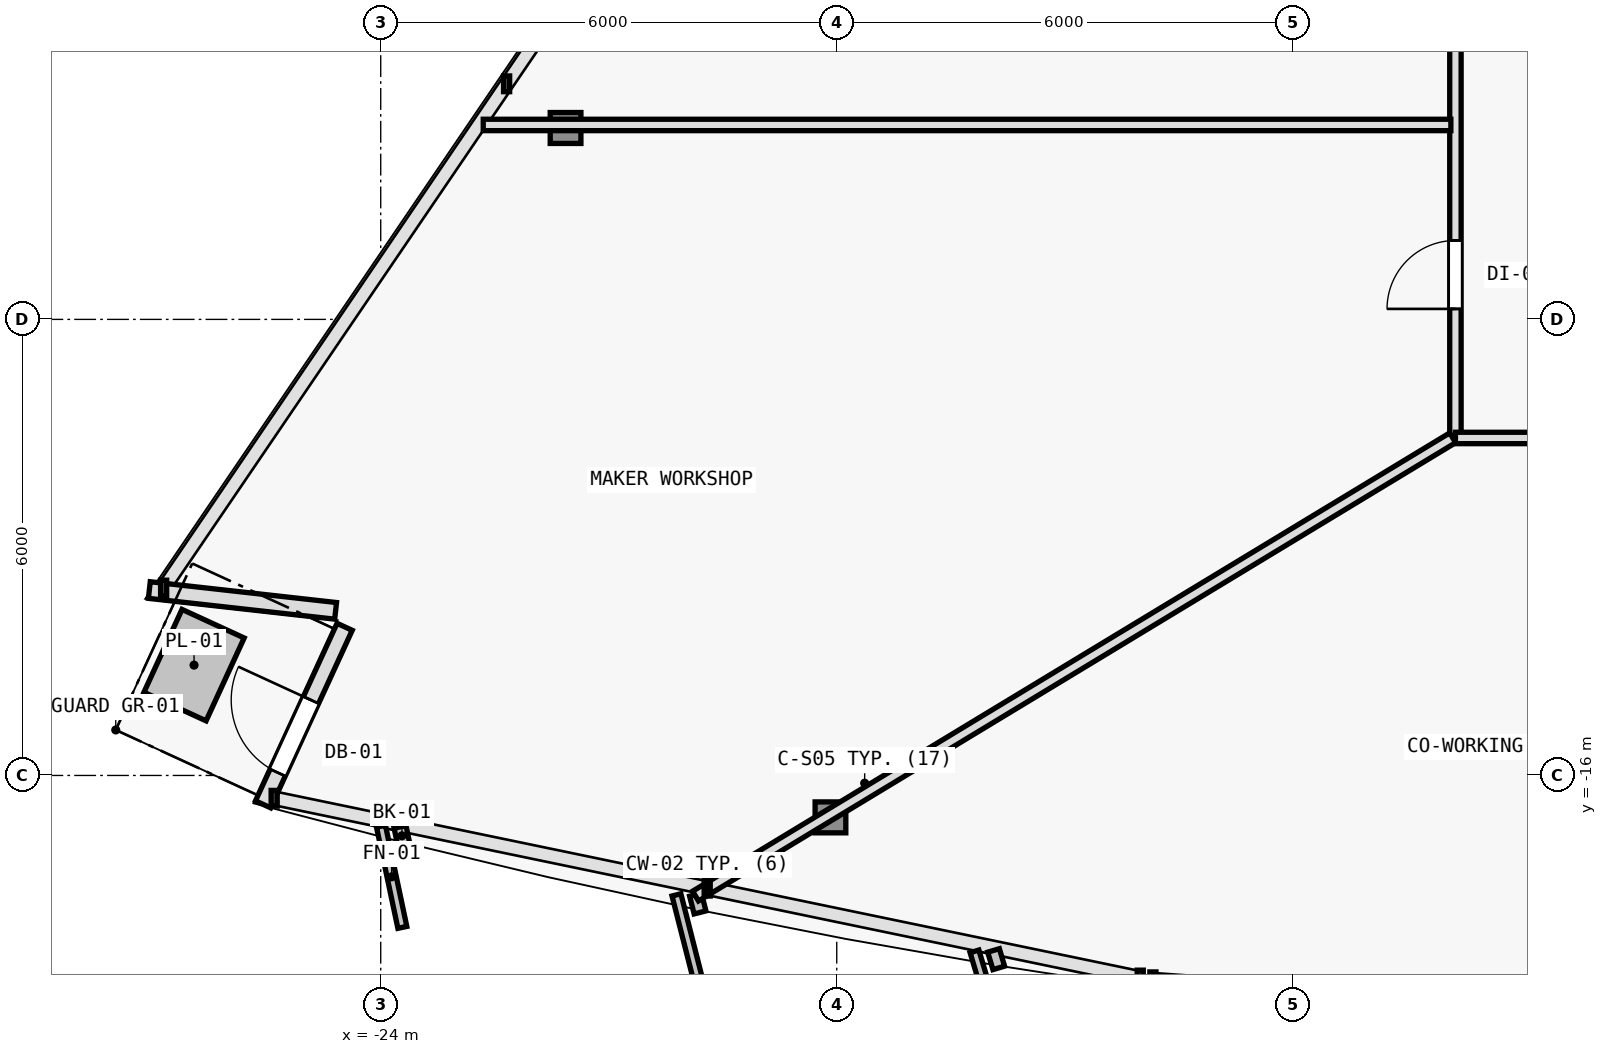
"""IFC4 building model, lengths in metres.
Left out: names, types, materials, properties, quantities, classifications, styles, units other than length and angle.
Written with IfcOpenShell. Run it as: python <this file> out.ifc"""

import sys

from ifc_helpers import new_model, si_unit, direction, frame, frame_2d, origin, origin_2d, place, context, subcontext, project, spatial, rectangle, i_section, extrude, element, fill, save


model = new_model("IFC4")
c1 = context("Model", 3, precision=1e-05, world=origin(), true_north=direction((0.0, 1.0)))
c2 = subcontext(c1, "Body", "Model", "MODEL_VIEW")
j1 = project(units=[si_unit("LENGTHUNIT", "METRE"), si_unit("PLANEANGLEUNIT", "RADIAN")], contexts=[c1])
p1 = place(None, origin())
s1 = spatial("IfcSite", under=j1, at=p1, CompositionType="ELEMENT")
p2 = place(p1, origin())
s2 = spatial("IfcBuilding", under=s1, at=p2, CompositionType="ELEMENT")
p3 = place(p2, frame((0.0, 0.0, 142.2)))
s3 = spatial("IfcBuildingStorey", under=s2, at=p3, CompositionType="ELEMENT", Elevation=142.2)
p4 = place(p3, frame((-18.083, -16.552, 0.006), z_axis=(0.021139215222, 0.034393707082, 0.999184770947), x_axis=(-0.851947232707, 0.52362764698, 0.0)))
e1 = element("IfcColumn", 1, at=p4, inside=s3, PredefinedType="COLUMN", context=c2, shape_type="SweptSolid", body=[
    extrude(i_section(OverallWidth=0.404, OverallDepth=0.407, WebThickness=0.017, FlangeThickness=0.028, FilletRadius=0.015, at=origin_2d()), origin(), (0.0, 0.0, 1.0), 3.592),
])
p5 = place(p3, frame((-21.568, -7.482, 0.006), z_axis=(0.025971243376, 0.022163940683, 0.999416957156), x_axis=(-0.649149996291, 0.760660425102, 0.0)))
e2 = element("IfcColumn", 2, at=p5, inside=s3, PredefinedType="COLUMN", context=c2, shape_type="SweptSolid", body=[
    extrude(i_section(OverallWidth=0.404, OverallDepth=0.407, WebThickness=0.017, FlangeThickness=0.028, FilletRadius=0.015, at=origin_2d()), origin(), (0.0, 0.0, 1.0), 3.591),
])
p6 = place(p3, frame((-24.594, -13.834, 0.0), z_axis=(0.0, 0.0, 1.0), x_axis=(-0.993823222634, 0.110974781609, 0.0)))
e3 = element("IfcWall", 3, at=p6, inside=s3, PredefinedType="SOLIDWALL", context=c2, shape_type="SweptSolid", body=[
    extrude(rectangle(XDim=2.466, YDim=0.22, at=frame_2d((1.233, 0.0))), origin(), (0.0, 0.0, 1.0), 3.35),
])
p7 = place(p3, frame((-25.548, -16.38, 0.0), z_axis=(0.0, 0.0, 1.0), x_axis=(0.417449299542, 0.908700215864, 0.0)))
e4 = element("IfcWall", 4, at=p7, inside=s3, PredefinedType="SOLIDWALL", context=c2, shape_type="SweptSolid", body=[
    extrude(rectangle(XDim=2.57, YDim=0.22, at=frame_2d((1.285, 0.0))), origin(), (0.0, 0.0, 1.0), 3.35),
])
p8 = place(p7, frame((0.46, 0.0, 0.0)))
e5 = element("IfcOpeningElement", 5, at=p8, cuts=e4, PredefinedType="OPENING", context=c2, shape_type="SweptSolid", body=[
    extrude(rectangle(XDim=1.05, YDim=2.15, at=frame_2d((0.525, 1.075))), frame((0.0, 0.12, 0.0), z_axis=(0.0, -1.0, 0.0), x_axis=(1.0, 0.0, 0.0)), (0.0, 0.0, 1.0), 0.24),
])
p9 = place(p3, frame((-9.86, -11.56, 0.0), z_axis=(0.0, 0.0, 1.0), x_axis=(0.0, 1.0, 0.0)))
e6 = element("IfcWall", 6, at=p9, inside=s3, PredefinedType="PARTITIONING", context=c2, shape_type="SweptSolid", body=[
    extrude(rectangle(XDim=19.986, YDim=0.15, at=frame_2d((9.993, 0.0))), origin(), (0.0, 0.0, 1.0), 2.775),
])
p10 = place(p9, frame((7.769, 0.0, 0.0)))
e7 = element("IfcOpeningElement", 7, at=p10, cuts=e6, PredefinedType="OPENING", context=c2, shape_type="SweptSolid", body=[
    extrude(rectangle(XDim=0.9, YDim=2.1, at=frame_2d((0.45, 1.05))), frame((0.0, 0.085, 0.0), z_axis=(0.0, -1.0, 0.0), x_axis=(1.0, 0.0, 0.0)), (0.0, 0.0, 1.0), 0.17),
])
p11 = place(p9, frame((1.698, 0.0, 0.0)))
e8 = element("IfcOpeningElement", 8, at=p11, cuts=e6, PredefinedType="OPENING", context=c2, shape_type="SweptSolid", body=[
    extrude(rectangle(XDim=0.9, YDim=2.1, at=frame_2d((0.45, 1.05))), frame((0.0, 0.085, 0.0), z_axis=(0.0, -1.0, 0.0), x_axis=(1.0, 0.0, 0.0)), (0.0, 0.0, 1.0), 0.17),
])
p12 = place(p9, frame((15.614, 0.0, 0.0)))
e9 = element("IfcOpeningElement", 9, at=p12, cuts=e6, PredefinedType="OPENING", context=c2, shape_type="SweptSolid", body=[
    extrude(rectangle(XDim=0.9, YDim=2.1, at=frame_2d((0.45, 1.05))), frame((0.0, 0.085, 0.0), z_axis=(0.0, -1.0, 0.0), x_axis=(1.0, 0.0, 0.0)), (0.0, 0.0, 1.0), 0.17),
])
p13 = place(p3, frame((13.18, -11.56, 0.0), z_axis=(0.0, 0.0, 1.0), x_axis=(-1.0, 0.0, 0.0)))
e10 = element("IfcWall", 10, at=p13, inside=s3, PredefinedType="PARTITIONING", context=c2, shape_type="SweptSolid", body=[
    extrude(rectangle(XDim=23.04, YDim=0.15, at=frame_2d((11.52, 0.0))), origin(), (0.0, 0.0, 1.0), 2.775),
])
p14 = place(p13, frame((20.042, 0.0, 0.0)))
e11 = element("IfcOpeningElement", 11, at=p14, cuts=e10, PredefinedType="OPENING", context=c2, shape_type="SweptSolid", body=[
    extrude(rectangle(XDim=0.9, YDim=2.1, at=frame_2d((0.45, 1.05))), frame((0.0, 0.085, 0.0), z_axis=(0.0, -1.0, 0.0), x_axis=(1.0, 0.0, 0.0)), (0.0, 0.0, 1.0), 0.17),
])
p15 = place(p13, frame((12.178, 0.0, 0.0)))
e12 = element("IfcOpeningElement", 12, at=p15, cuts=e10, PredefinedType="OPENING", context=c2, shape_type="SweptSolid", body=[
    extrude(rectangle(XDim=0.9, YDim=2.1, at=frame_2d((0.45, 1.05))), frame((0.0, 0.085, 0.0), z_axis=(0.0, -1.0, 0.0), x_axis=(1.0, 0.0, 0.0)), (0.0, 0.0, 1.0), 0.17),
])
p16 = place(p13, frame((3.205, 0.0, 0.0)))
e13 = element("IfcOpeningElement", 13, at=p16, cuts=e10, PredefinedType="OPENING", context=c2, shape_type="SweptSolid", body=[
    extrude(rectangle(XDim=0.9, YDim=2.1, at=frame_2d((0.45, 1.05))), frame((0.0, 0.085, 0.0), z_axis=(0.0, -1.0, 0.0), x_axis=(1.0, 0.0, 0.0)), (0.0, 0.0, 1.0), 0.17),
])
p17 = place(p3, frame((-9.896, -11.558, 0.0), z_axis=(0.0, 0.0, 1.0), x_axis=(-0.855495923948, -0.517809544243, 0.0)))
e14 = element("IfcWall", 14, at=p17, inside=s3, PredefinedType="PARTITIONING", context=c2, shape_type="SweptSolid", body=[
    extrude(rectangle(XDim=11.644, YDim=0.15, at=frame_2d((5.822, 0.0))), origin(), (0.0, 0.0, 1.0), 2.775),
])
p18 = place(p3, frame((-9.92, -7.442, 0.0), z_axis=(0.0, 0.0, 1.0), x_axis=(-1.0, 0.0, 0.0)))
e15 = element("IfcWall", 15, at=p18, inside=s3, PredefinedType="PARTITIONING", context=c2, shape_type="SweptSolid", body=[
    extrude(rectangle(XDim=12.731, YDim=0.15, at=frame_2d((6.366, 0.0))), origin(), (0.0, 0.0, 1.0), 2.775),
])
p19 = place(p8, origin())
e16 = element("IfcDoor", 16, at=p19, inside=s3, OperationType="SINGLE_SWING_RIGHT", PredefinedType="DOOR", context=c2, shape_type="SweptSolid", body=[
    extrude(rectangle(XDim=1.05, YDim=2.15, at=frame_2d((0.525, 1.075))), frame((0.0, 0.025, 0.0), z_axis=(0.0, -1.0, 0.0), x_axis=(1.0, 0.0, 0.0)), (0.0, 0.0, 1.0), 0.05),
])
fill(e5, e16)
p20 = place(p11, origin())
e17 = element("IfcDoor", 17, at=p20, inside=s3, OperationType="SINGLE_SWING_LEFT", PredefinedType="DOOR", context=c2, shape_type="SweptSolid", body=[
    extrude(rectangle(XDim=0.9, YDim=2.1, at=frame_2d((0.45, 1.05))), frame((0.0, 0.025, 0.0), z_axis=(0.0, -1.0, 0.0), x_axis=(1.0, 0.0, 0.0)), (0.0, 0.0, 1.0), 0.05),
])
fill(e8, e17)
save(model, sys.argv[1])
